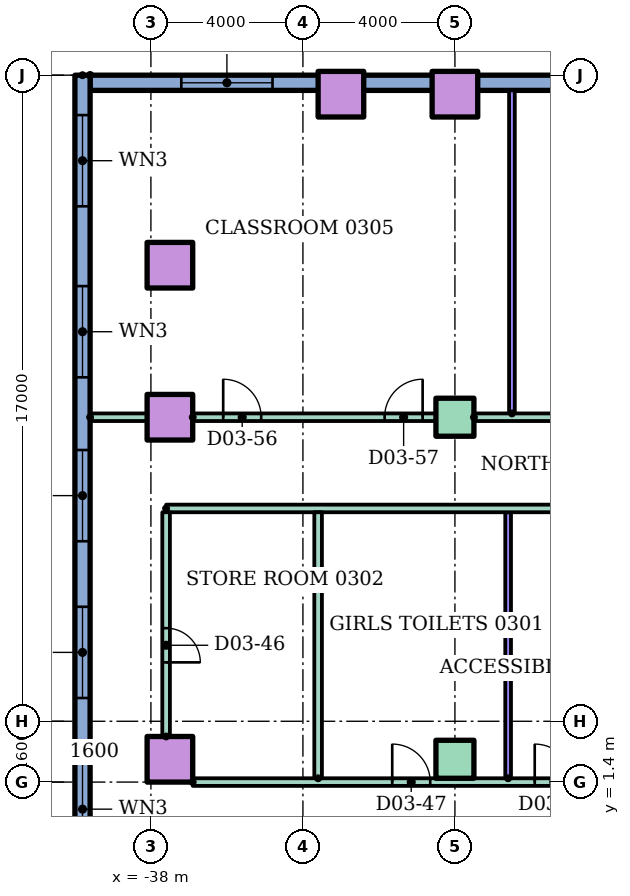
"""IFC4 building model, lengths in metres.
Left out: names, types, materials, properties, quantities, classifications, styles, units other than length and angle.
Written with IfcOpenShell. Run it as: python <this file> out.ifc"""

import sys

from ifc_helpers import new_model, si_unit, direction, frame, frame_2d, origin, origin_2d, place, context, subcontext, project, spatial, rectangle, hollow_rectangle, extrude, element, fill, save


model = new_model("IFC4")
c1 = context("Model", 3, precision=1e-05, world=origin(), true_north=direction((0.0, 1.0)))
c2 = subcontext(c1, "Body", "Model", "MODEL_VIEW")
j1 = project(units=[si_unit("LENGTHUNIT", "METRE"), si_unit("PLANEANGLEUNIT", "RADIAN")], contexts=[c1])
p1 = place(None, origin())
s1 = spatial("IfcSite", under=j1, at=p1, CompositionType="ELEMENT")
p2 = place(p1, origin())
s2 = spatial("IfcBuilding", under=s1, at=p2, CompositionType="ELEMENT")
p3 = place(p2, frame((0.0, 0.0, 14.0)))
s3 = spatial("IfcBuildingStorey", under=s2, at=p3, CompositionType="ELEMENT", Elevation=14.0)
p4 = place(p3, frame((-37.5, 2.0, 0.0)))
e1 = element("IfcColumn", 1, at=p4, inside=s3, PredefinedType="COLUMN", context=c2, shape_type="SweptSolid", body=[
    extrude(hollow_rectangle(XDim=1.2, YDim=1.2, WallThickness=0.06, at=origin_2d()), origin(), (0.0, 0.0, 1.0), 4.0),
])
p5 = place(p3, frame((-30.0, 2.0, 0.0)))
e2 = element("IfcColumn", 2, at=p5, inside=s3, PredefinedType="COLUMN", context=c2, shape_type="SweptSolid", body=[
    extrude(rectangle(XDim=1.0, YDim=1.0, at=origin_2d()), origin(), (0.0, 0.0, 1.0), 4.0),
])
p6 = place(p3, frame((-37.5, 11.0, 0.0)))
e3 = element("IfcColumn", 3, at=p6, inside=s3, PredefinedType="COLUMN", context=c2, shape_type="SweptSolid", body=[
    extrude(hollow_rectangle(XDim=1.2, YDim=1.2, WallThickness=0.06, at=origin_2d()), origin(), (0.0, 0.0, 1.0), 4.0),
])
p7 = place(p3, frame((-30.0, 11.0, 0.0)))
e4 = element("IfcColumn", 4, at=p7, inside=s3, PredefinedType="COLUMN", context=c2, shape_type="SweptSolid", body=[
    extrude(rectangle(XDim=1.0, YDim=1.0, at=origin_2d()), origin(), (0.0, 0.0, 1.0), 4.0),
])
for number, where in (
    (5, (-37.5, 15.0, 0.0)),
    (6, (-33.0, 19.5, 0.0)),
    (7, (-30.0, 19.5, 0.0)),
):
    element("IfcColumn", number, at=place(p3, frame(where)), inside=s3, PredefinedType="COLUMN", context=c2, shape_type="SweptSolid", body=[
        extrude(hollow_rectangle(XDim=1.2, YDim=1.2, WallThickness=0.06, at=origin_2d()), origin(), (0.0, 0.0, 1.0), 4.0),
    ])
p8 = place(p3, frame((-14.0, 19.8, 0.0), z_axis=(0.0, 0.0, 1.0), x_axis=(-1.0, 0.0, 0.0)))
e8 = element("IfcWall", 8, at=p8, inside=s3, PredefinedType="STANDARD", context=c2, shape_type="SweptSolid", body=[
    extrude(rectangle(XDim=25.6, YDim=0.4, at=frame_2d((12.8, 0.0))), origin(), (0.0, 0.0, 1.0), 3.7),
])
p9 = place(p8, frame((0.8, 0.0, 0.9)))
e9 = element("IfcOpeningElement", 9, at=p9, cuts=e8, PredefinedType="OPENING", context=c2, shape_type="SweptSolid", body=[
    extrude(rectangle(XDim=2.4, YDim=2.1, at=frame_2d((1.2, 1.05))), frame((0.0, 0.21, 0.0), z_axis=(0.0, -1.0, 0.0), x_axis=(1.0, 0.0, 0.0)), (0.0, 0.0, 1.0), 0.42),
])
p10 = place(p8, frame((4.535, 0.0, 0.9)))
e10 = element("IfcOpeningElement", 10, at=p10, cuts=e8, PredefinedType="OPENING", context=c2, shape_type="SweptSolid", body=[
    extrude(rectangle(XDim=2.4, YDim=2.1, at=frame_2d((1.2, 1.05))), frame((0.0, 0.21, 0.0), z_axis=(0.0, -1.0, 0.0), x_axis=(1.0, 0.0, 0.0)), (0.0, 0.0, 1.0), 0.42),
])
p11 = place(p8, frame((20.8, 0.0, 0.9)))
e11 = element("IfcOpeningElement", 11, at=p11, cuts=e8, PredefinedType="OPENING", context=c2, shape_type="SweptSolid", body=[
    extrude(rectangle(XDim=2.4, YDim=2.1, at=frame_2d((1.2, 1.05))), frame((0.0, 0.21, 0.0), z_axis=(0.0, -1.0, 0.0), x_axis=(1.0, 0.0, 0.0)), (0.0, 0.0, 1.0), 0.42),
])
p12 = place(p3, frame((-39.8, 20.0, 0.0), z_axis=(0.0, 0.0, 1.0), x_axis=(0.0, -1.0, 0.0)))
e12 = element("IfcWall", 12, at=p12, inside=s3, PredefinedType="STANDARD", context=c2, shape_type="SweptSolid", body=[
    extrude(rectangle(XDim=70.0, YDim=0.4, at=frame_2d((35.0, 0.0))), origin(), (0.0, 0.0, 1.0), 3.7),
])
p13 = place(p12, frame((1.05, 0.0, 0.9)))
e13 = element("IfcOpeningElement", 13, at=p13, cuts=e12, PredefinedType="OPENING", context=c2, shape_type="SweptSolid", body=[
    extrude(rectangle(XDim=2.4, YDim=2.1, at=frame_2d((1.2, 1.05))), frame((0.0, 0.21, 0.0), z_axis=(0.0, -1.0, 0.0), x_axis=(1.0, 0.0, 0.0)), (0.0, 0.0, 1.0), 0.42),
])
p14 = place(p12, frame((5.55, 0.0, 0.9)))
e14 = element("IfcOpeningElement", 14, at=p14, cuts=e12, PredefinedType="OPENING", context=c2, shape_type="SweptSolid", body=[
    extrude(rectangle(XDim=2.4, YDim=2.1, at=frame_2d((1.2, 1.05))), frame((0.0, 0.21, 0.0), z_axis=(0.0, -1.0, 0.0), x_axis=(1.0, 0.0, 0.0)), (0.0, 0.0, 1.0), 0.42),
])
p15 = place(p12, frame((9.863, 0.0, 0.9)))
e15 = element("IfcOpeningElement", 15, at=p15, cuts=e12, PredefinedType="OPENING", context=c2, shape_type="SweptSolid", body=[
    extrude(rectangle(XDim=2.4, YDim=2.1, at=frame_2d((1.2, 1.05))), frame((0.0, 0.21, 0.0), z_axis=(0.0, -1.0, 0.0), x_axis=(1.0, 0.0, 0.0)), (0.0, 0.0, 1.0), 0.42),
])
p16 = place(p12, frame((13.988, 0.0, 0.9)))
e16 = element("IfcOpeningElement", 16, at=p16, cuts=e12, PredefinedType="OPENING", context=c2, shape_type="SweptSolid", body=[
    extrude(rectangle(XDim=2.4, YDim=2.1, at=frame_2d((1.2, 1.05))), frame((0.0, 0.21, 0.0), z_axis=(0.0, -1.0, 0.0), x_axis=(1.0, 0.0, 0.0)), (0.0, 0.0, 1.0), 0.42),
])
p17 = place(p12, frame((18.113, 0.0, 0.9)))
e17 = element("IfcOpeningElement", 17, at=p17, cuts=e12, PredefinedType="OPENING", context=c2, shape_type="SweptSolid", body=[
    extrude(rectangle(XDim=2.4, YDim=2.1, at=frame_2d((1.2, 1.05))), frame((0.0, 0.21, 0.0), z_axis=(0.0, -1.0, 0.0), x_axis=(1.0, 0.0, 0.0)), (0.0, 0.0, 1.0), 0.42),
])
p18 = place(p12, frame((22.238, 0.0, 0.9)))
e18 = element("IfcOpeningElement", 18, at=p18, cuts=e12, PredefinedType="OPENING", context=c2, shape_type="SweptSolid", body=[
    extrude(rectangle(XDim=2.4, YDim=2.1, at=frame_2d((1.2, 1.05))), frame((0.0, 0.21, 0.0), z_axis=(0.0, -1.0, 0.0), x_axis=(1.0, 0.0, 0.0)), (0.0, 0.0, 1.0), 0.42),
])
p19 = place(p12, frame((26.363, 0.0, 0.9)))
e19 = element("IfcOpeningElement", 19, at=p19, cuts=e12, PredefinedType="OPENING", context=c2, shape_type="SweptSolid", body=[
    extrude(rectangle(XDim=2.4, YDim=2.1, at=frame_2d((1.2, 1.05))), frame((0.0, 0.21, 0.0), z_axis=(0.0, -1.0, 0.0), x_axis=(1.0, 0.0, 0.0)), (0.0, 0.0, 1.0), 0.42),
])
p20 = place(p12, frame((30.488, 0.0, 0.9)))
e20 = element("IfcOpeningElement", 20, at=p20, cuts=e12, PredefinedType="OPENING", context=c2, shape_type="SweptSolid", body=[
    extrude(rectangle(XDim=2.4, YDim=2.1, at=frame_2d((1.2, 1.05))), frame((0.0, 0.21, 0.0), z_axis=(0.0, -1.0, 0.0), x_axis=(1.0, 0.0, 0.0)), (0.0, 0.0, 1.0), 0.42),
])
p21 = place(p12, frame((34.613, 0.0, 0.9)))
e21 = element("IfcOpeningElement", 21, at=p21, cuts=e12, PredefinedType="OPENING", context=c2, shape_type="SweptSolid", body=[
    extrude(rectangle(XDim=2.4, YDim=2.1, at=frame_2d((1.2, 1.05))), frame((0.0, 0.21, 0.0), z_axis=(0.0, -1.0, 0.0), x_axis=(1.0, 0.0, 0.0)), (0.0, 0.0, 1.0), 0.42),
])
p22 = place(p12, frame((38.738, 0.0, 0.9)))
e22 = element("IfcOpeningElement", 22, at=p22, cuts=e12, PredefinedType="OPENING", context=c2, shape_type="SweptSolid", body=[
    extrude(rectangle(XDim=2.4, YDim=2.1, at=frame_2d((1.2, 1.05))), frame((0.0, 0.21, 0.0), z_axis=(0.0, -1.0, 0.0), x_axis=(1.0, 0.0, 0.0)), (0.0, 0.0, 1.0), 0.42),
])
p23 = place(p12, frame((66.85, 0.0, 0.9)))
e23 = element("IfcOpeningElement", 23, at=p23, cuts=e12, PredefinedType="OPENING", context=c2, shape_type="SweptSolid", body=[
    extrude(rectangle(XDim=2.4, YDim=2.1, at=frame_2d((1.2, 1.05))), frame((0.0, 0.21, 0.0), z_axis=(0.0, -1.0, 0.0), x_axis=(1.0, 0.0, 0.0)), (0.0, 0.0, 1.0), 0.42),
])
p24 = place(p3, frame((-36.9, 1.4, 0.0)))
e24 = element("IfcWall", 24, at=p24, inside=s3, PredefinedType="PARTITIONING", context=c2, shape_type="SweptSolid", body=[
    extrude(rectangle(XDim=20.6, YDim=0.2, at=frame_2d((10.3, 0.0))), origin(), (0.0, 0.0, 1.0), 3.7),
])
p25 = place(p24, frame((5.25, 0.0, 0.0)))
e25 = element("IfcOpeningElement", 25, at=p25, cuts=e24, PredefinedType="OPENING", context=c2, shape_type="SweptSolid", body=[
    extrude(rectangle(XDim=1.0, YDim=2.1, at=frame_2d((0.5, 1.05))), frame((0.0, 0.11, 0.0), z_axis=(0.0, -1.0, 0.0), x_axis=(1.0, 0.0, 0.0)), (0.0, 0.0, 1.0), 0.22),
])
p26 = place(p24, frame((9.0, 0.0, 0.0)))
e26 = element("IfcOpeningElement", 26, at=p26, cuts=e24, PredefinedType="OPENING", context=c2, shape_type="SweptSolid", body=[
    extrude(rectangle(XDim=1.0, YDim=2.1, at=frame_2d((0.5, 1.05))), frame((0.0, 0.11, 0.0), z_axis=(0.0, -1.0, 0.0), x_axis=(1.0, 0.0, 0.0)), (0.0, 0.0, 1.0), 0.22),
])
p27 = place(p24, frame((12.7, 0.0, 0.0)))
e27 = element("IfcOpeningElement", 27, at=p27, cuts=e24, PredefinedType="OPENING", context=c2, shape_type="SweptSolid", body=[
    extrude(rectangle(XDim=1.0, YDim=2.1, at=frame_2d((0.5, 1.05))), frame((0.0, 0.11, 0.0), z_axis=(0.0, -1.0, 0.0), x_axis=(1.0, 0.0, 0.0)), (0.0, 0.0, 1.0), 0.22),
])
p28 = place(p3, frame((-37.6, 8.6, 0.0)))
e28 = element("IfcWall", 28, at=p28, inside=s3, PredefinedType="PARTITIONING", context=c2, shape_type="SweptSolid", body=[
    extrude(rectangle(XDim=21.3, YDim=0.2, at=frame_2d((10.65, 0.0))), origin(), (0.0, 0.0, 1.0), 3.7),
])
p29 = place(p3, frame((-39.6, 11.0, 0.0)))
e29 = element("IfcWall", 29, at=p29, inside=s3, PredefinedType="PARTITIONING", context=c2, shape_type="SweptSolid", body=[
    extrude(rectangle(XDim=1.5, YDim=0.2, at=frame_2d((0.75, 0.0))), origin(), (0.0, 0.0, 1.0), 3.7),
])
p30 = place(p3, frame((-36.9, 11.0, 0.0)))
e30 = element("IfcWall", 30, at=p30, inside=s3, PredefinedType="PARTITIONING", context=c2, shape_type="SweptSolid", body=[
    extrude(rectangle(XDim=6.4, YDim=0.2, at=frame_2d((3.2, 0.0))), origin(), (0.0, 0.0, 1.0), 3.7),
])
p31 = place(p30, frame((0.802, 0.0, 0.0)))
e31 = element("IfcOpeningElement", 31, at=p31, cuts=e30, PredefinedType="OPENING", context=c2, shape_type="SweptSolid", body=[
    extrude(rectangle(XDim=1.0, YDim=2.1, at=frame_2d((0.5, 1.05))), frame((0.0, 0.11, 0.0), z_axis=(0.0, -1.0, 0.0), x_axis=(1.0, 0.0, 0.0)), (0.0, 0.0, 1.0), 0.22),
])
p32 = place(p30, frame((5.05, 0.0, 0.0)))
e32 = element("IfcOpeningElement", 32, at=p32, cuts=e30, PredefinedType="OPENING", context=c2, shape_type="SweptSolid", body=[
    extrude(rectangle(XDim=1.0, YDim=2.1, at=frame_2d((0.5, 1.05))), frame((0.0, 0.11, 0.0), z_axis=(0.0, -1.0, 0.0), x_axis=(1.0, 0.0, 0.0)), (0.0, 0.0, 1.0), 0.22),
])
p33 = place(p3, frame((-29.5, 11.0, 0.0)))
e33 = element("IfcWall", 33, at=p33, inside=s3, PredefinedType="PARTITIONING", context=c2, shape_type="SweptSolid", body=[
    extrude(rectangle(XDim=7.0, YDim=0.2, at=frame_2d((3.5, 0.0))), origin(), (0.0, 0.0, 1.0), 3.7),
])
p34 = place(p3, frame((-37.6, 2.6, 0.0), z_axis=(0.0, 0.0, 1.0), x_axis=(0.0, 1.0, 0.0)))
e34 = element("IfcWall", 34, at=p34, inside=s3, PredefinedType="PARTITIONING", context=c2, shape_type="SweptSolid", body=[
    extrude(rectangle(XDim=5.9, YDim=0.2, at=frame_2d((2.95, 0.0))), origin(), (0.0, 0.0, 1.0), 3.7),
])
p35 = place(p34, frame((1.95, 0.0, 0.0)))
e35 = element("IfcOpeningElement", 35, at=p35, cuts=e34, PredefinedType="OPENING", context=c2, shape_type="SweptSolid", body=[
    extrude(rectangle(XDim=0.9, YDim=2.1, at=frame_2d((0.45, 1.05))), frame((0.0, 0.11, 0.0), z_axis=(0.0, -1.0, 0.0), x_axis=(1.0, 0.0, 0.0)), (0.0, 0.0, 1.0), 0.22),
])
p36 = place(p3, frame((-33.6, 1.5, 0.0), z_axis=(0.0, 0.0, 1.0), x_axis=(0.0, 1.0, 0.0)))
e36 = element("IfcWall", 36, at=p36, inside=s3, PredefinedType="PARTITIONING", context=c2, shape_type="SweptSolid", body=[
    extrude(rectangle(XDim=7.0, YDim=0.2, at=frame_2d((3.5, 0.0))), origin(), (0.0, 0.0, 1.0), 3.7),
])
p37 = place(p3, frame((-28.6, 1.5, 0.0), z_axis=(0.0, 0.0, 1.0), x_axis=(0.0, 1.0, 0.0)))
e37 = element("IfcWall", 37, at=p37, inside=s3, PredefinedType="PARTITIONING", context=c2, shape_type="SweptSolid", body=[
    extrude(rectangle(XDim=7.0, YDim=0.15, at=frame_2d((3.5, 0.0))), origin(), (0.0, 0.0, 1.0), 3.7),
])
p38 = place(p3, frame((-28.5, 11.1, 0.0), z_axis=(0.0, 0.0, 1.0), x_axis=(0.0, 1.0, 0.0)))
e38 = element("IfcWall", 38, at=p38, inside=s3, PredefinedType="PARTITIONING", context=c2, shape_type="SweptSolid", body=[
    extrude(rectangle(XDim=8.5, YDim=0.15, at=frame_2d((4.25, 0.0))), origin(), (0.0, 0.0, 1.0), 3.7),
])
p39 = place(p11, origin())
e39 = element("IfcWindow", 39, at=p39, inside=s3, PartitioningType="SINGLE_PANEL", PredefinedType="WINDOW", context=c2, shape_type="SweptSolid", body=[
    extrude(rectangle(XDim=2.4, YDim=2.1, at=frame_2d((1.2, 1.05))), frame((0.0, 0.03, 0.0), z_axis=(0.0, -1.0, 0.0), x_axis=(1.0, 0.0, 0.0)), (0.0, 0.0, 1.0), 0.06),
])
fill(e11, e39)
p40 = place(p13, origin())
e40 = element("IfcWindow", 40, at=p40, inside=s3, PartitioningType="SINGLE_PANEL", PredefinedType="WINDOW", context=c2, shape_type="SweptSolid", body=[
    extrude(rectangle(XDim=2.4, YDim=2.1, at=frame_2d((1.2, 1.05))), frame((0.0, 0.03, 0.0), z_axis=(0.0, -1.0, 0.0), x_axis=(1.0, 0.0, 0.0)), (0.0, 0.0, 1.0), 0.06),
])
fill(e13, e40)
p41 = place(p14, origin())
e41 = element("IfcWindow", 41, at=p41, inside=s3, PartitioningType="SINGLE_PANEL", PredefinedType="WINDOW", context=c2, shape_type="SweptSolid", body=[
    extrude(rectangle(XDim=2.4, YDim=2.1, at=frame_2d((1.2, 1.05))), frame((0.0, 0.03, 0.0), z_axis=(0.0, -1.0, 0.0), x_axis=(1.0, 0.0, 0.0)), (0.0, 0.0, 1.0), 0.06),
])
fill(e14, e41)
p42 = place(p15, origin())
e42 = element("IfcWindow", 42, at=p42, inside=s3, PartitioningType="SINGLE_PANEL", PredefinedType="WINDOW", context=c2, shape_type="SweptSolid", body=[
    extrude(rectangle(XDim=2.4, YDim=2.1, at=frame_2d((1.2, 1.05))), frame((0.0, 0.03, 0.0), z_axis=(0.0, -1.0, 0.0), x_axis=(1.0, 0.0, 0.0)), (0.0, 0.0, 1.0), 0.06),
])
fill(e15, e42)
p43 = place(p16, origin())
e43 = element("IfcWindow", 43, at=p43, inside=s3, PartitioningType="SINGLE_PANEL", PredefinedType="WINDOW", context=c2, shape_type="SweptSolid", body=[
    extrude(rectangle(XDim=2.4, YDim=2.1, at=frame_2d((1.2, 1.05))), frame((0.0, 0.03, 0.0), z_axis=(0.0, -1.0, 0.0), x_axis=(1.0, 0.0, 0.0)), (0.0, 0.0, 1.0), 0.06),
])
fill(e16, e43)
p44 = place(p17, origin())
e44 = element("IfcWindow", 44, at=p44, inside=s3, PartitioningType="SINGLE_PANEL", PredefinedType="WINDOW", context=c2, shape_type="SweptSolid", body=[
    extrude(rectangle(XDim=2.4, YDim=2.1, at=frame_2d((1.2, 1.05))), frame((0.0, 0.03, 0.0), z_axis=(0.0, -1.0, 0.0), x_axis=(1.0, 0.0, 0.0)), (0.0, 0.0, 1.0), 0.06),
])
fill(e17, e44)
p45 = place(p35, frame((0.9, 0.0, 0.0), z_axis=(0.0, 0.0, 1.0), x_axis=(-1.0, 0.0, 0.0)))
e45 = element("IfcDoor", 45, at=p45, inside=s3, OperationType="SINGLE_SWING_LEFT", PredefinedType="DOOR", context=c2, shape_type="SweptSolid", body=[
    extrude(rectangle(XDim=0.9, YDim=2.1, at=frame_2d((0.45, 1.05))), frame((0.0, 0.025, 0.0), z_axis=(0.0, -1.0, 0.0), x_axis=(1.0, 0.0, 0.0)), (0.0, 0.0, 1.0), 0.05),
])
fill(e35, e45)
p46 = place(p25, origin())
e46 = element("IfcDoor", 46, at=p46, inside=s3, OperationType="SINGLE_SWING_LEFT", PredefinedType="DOOR", context=c2, shape_type="SweptSolid", body=[
    extrude(rectangle(XDim=1.0, YDim=2.1, at=frame_2d((0.5, 1.05))), frame((0.0, 0.025, 0.0), z_axis=(0.0, -1.0, 0.0), x_axis=(1.0, 0.0, 0.0)), (0.0, 0.0, 1.0), 0.05),
])
fill(e25, e46)
p47 = place(p26, origin())
e47 = element("IfcDoor", 47, at=p47, inside=s3, OperationType="SINGLE_SWING_LEFT", PredefinedType="DOOR", context=c2, shape_type="SweptSolid", body=[
    extrude(rectangle(XDim=1.0, YDim=2.1, at=frame_2d((0.5, 1.05))), frame((0.0, 0.025, 0.0), z_axis=(0.0, -1.0, 0.0), x_axis=(1.0, 0.0, 0.0)), (0.0, 0.0, 1.0), 0.05),
])
fill(e26, e47)
p48 = place(p31, origin())
e48 = element("IfcDoor", 48, at=p48, inside=s3, OperationType="SINGLE_SWING_LEFT", PredefinedType="DOOR", context=c2, shape_type="SweptSolid", body=[
    extrude(rectangle(XDim=1.0, YDim=2.1, at=frame_2d((0.5, 1.05))), frame((0.0, 0.025, 0.0), z_axis=(0.0, -1.0, 0.0), x_axis=(1.0, 0.0, 0.0)), (0.0, 0.0, 1.0), 0.05),
])
fill(e31, e48)
p49 = place(p32, origin())
e49 = element("IfcDoor", 49, at=p49, inside=s3, OperationType="SINGLE_SWING_RIGHT", PredefinedType="DOOR", context=c2, shape_type="SweptSolid", body=[
    extrude(rectangle(XDim=1.0, YDim=2.1, at=frame_2d((0.5, 1.05))), frame((0.0, 0.025, 0.0), z_axis=(0.0, -1.0, 0.0), x_axis=(1.0, 0.0, 0.0)), (0.0, 0.0, 1.0), 0.05),
])
fill(e32, e49)
save(model, sys.argv[1])
